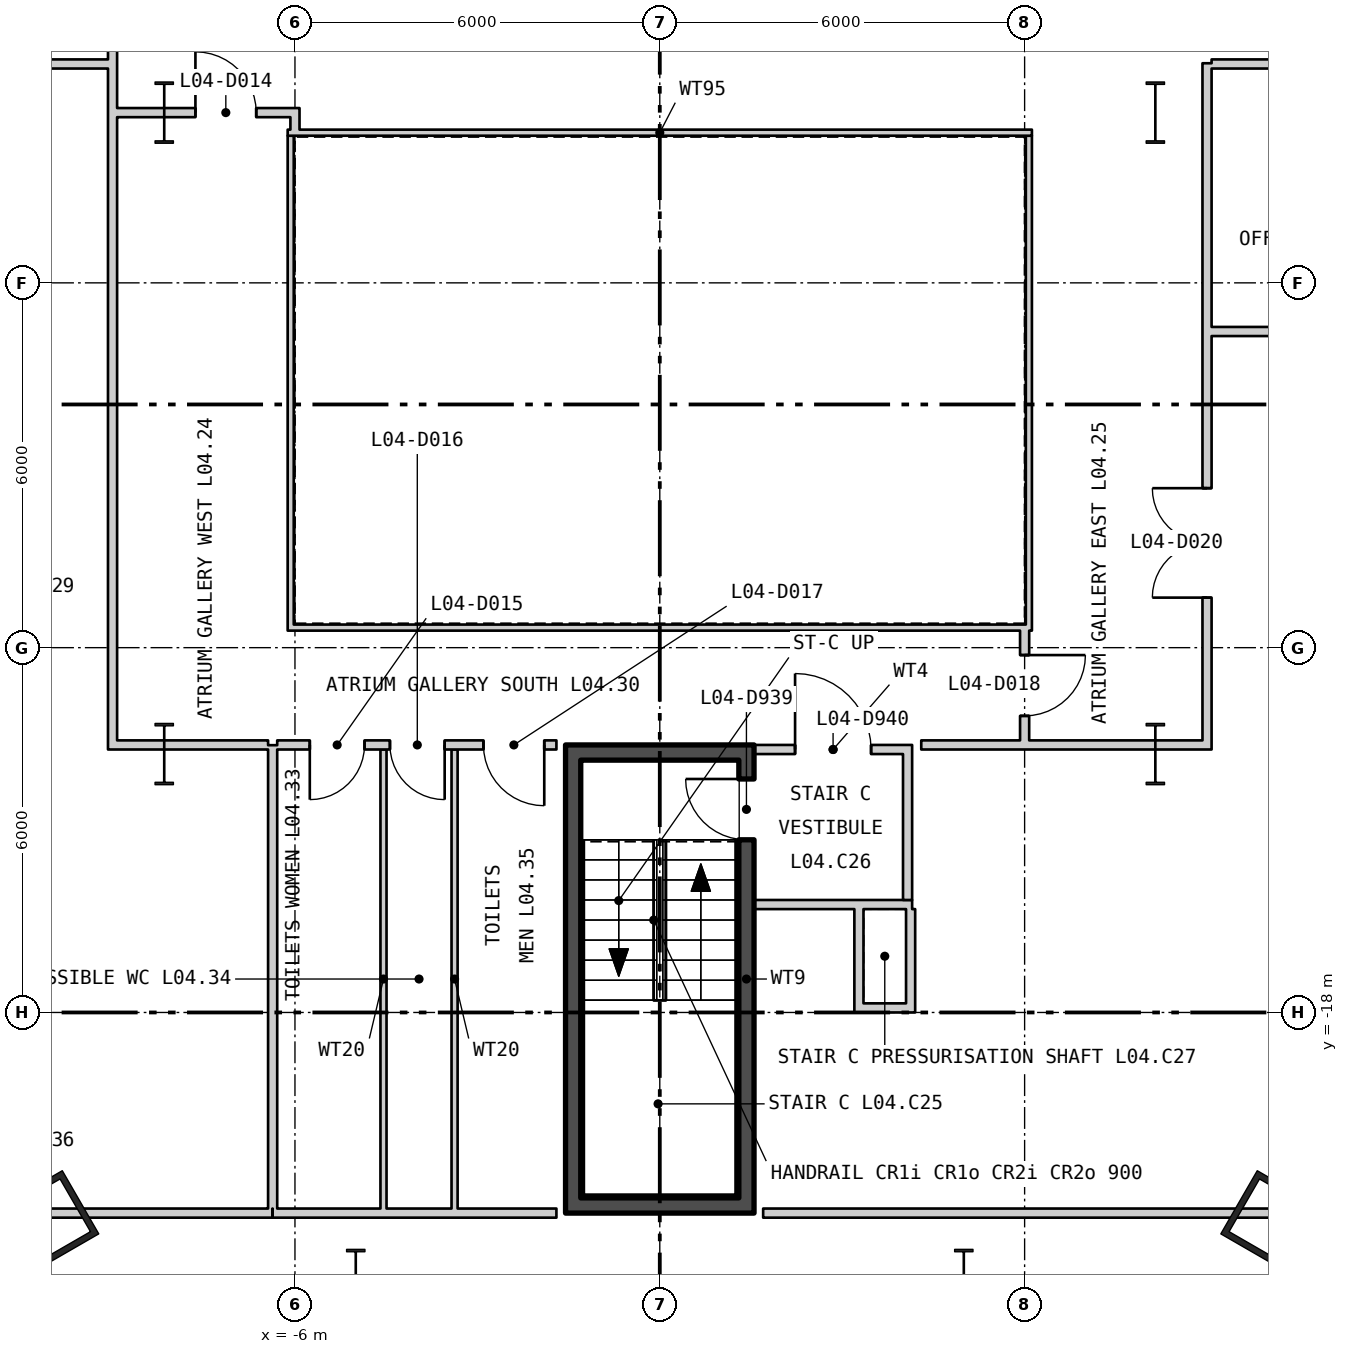
"""IFC4 building model, lengths in metres.
Left out: names, types, materials, properties, quantities, classifications, styles, units other than length and angle.
Written with IfcOpenShell. Run it as: python <this file> out.ifc"""

import sys

from ifc_helpers import new_model, si_unit, direction, frame, frame_2d, origin, origin_2d, place, context, subcontext, project, spatial, rectangle, hollow_rectangle, i_section, extrude, element, fill, save


model = new_model("IFC4")
c1 = context("Model", 3, precision=1e-05, world=origin(), true_north=direction((0.0, 1.0)))
c2 = subcontext(c1, "Body", "Model", "MODEL_VIEW")
j1 = project(units=[si_unit("LENGTHUNIT", "METRE"), si_unit("PLANEANGLEUNIT", "RADIAN")], contexts=[c1])
p1 = place(None, origin())
s1 = spatial("IfcSite", under=j1, at=p1, CompositionType="ELEMENT")
p2 = place(p1, origin())
s2 = spatial("IfcBuilding", under=s1, at=p2, CompositionType="ELEMENT")
p3 = place(p2, frame((0.0, 0.0, 23.7)))
s3 = spatial("IfcBuildingStorey", under=s2, at=p3, CompositionType="ELEMENT", Elevation=23.7)
for number, where, z_axis, x_axis in (
    (1, (-10.046, -21.422, 0.0), (0.0, 0.0, 1.0), (0.5, -0.866, 0.0)),
    (2, (10.046, -21.422, 0.0), (0.0, 0.0, 1.0), (0.5, 0.866, 0.0)),
):
    element("IfcColumn", number, at=place(p3, frame(where, z_axis=z_axis, x_axis=x_axis)), inside=s3, PredefinedType="COLUMN", context=c2, shape_type="SweptSolid", body=[
        extrude(hollow_rectangle(XDim=1.2, YDim=1.2, WallThickness=0.1, at=origin_2d()), origin(), (0.0, 0.0, 1.0), 5.1),
    ])
for number, where, z_axis, x_axis in (
    (3, (8.15, -3.2, 0.0), (0.0, 0.0, 1.0), (1.0, 0.0, 0.0)),
    (4, (-8.15, -3.2, 0.0), (0.0, 0.0, 1.0), (1.0, 0.0, 0.0)),
    (5, (8.15, -13.75, 0.0), (0.0, 0.0, 1.0), (1.0, 0.0, 0.0)),
    (6, (-8.15, -13.75, 0.0), (0.0, 0.0, 1.0), (1.0, 0.0, 0.0)),
    (7, (5.0, -22.4, 0.0), (0.0, 0.0, 1.0), (1.0, 0.0, 0.0)),
    (8, (-5.0, -22.4, 0.0), (0.0, 0.0, 1.0), (1.0, 0.0, 0.0)),
):
    element("IfcColumn", number, at=place(p3, frame(where, z_axis=z_axis, x_axis=x_axis)), inside=s3, PredefinedType="COLUMN", context=c2, shape_type="SweptSolid", body=[
        extrude(i_section(OverallWidth=0.302, OverallDepth=1.008, WebThickness=0.021, FlangeThickness=0.04, at=origin_2d()), origin(), (0.0, 0.0, 1.0), 5.1),
    ])
p4 = place(p3, frame((-6.12, -11.67, 0.0), z_axis=(0.0, 0.0, 1.0), x_axis=(1.0, 0.0, 0.0)))
e9 = element("IfcWall", 9, at=p4, inside=s3, PredefinedType="PARTITIONING", context=c2, shape_type="SweptSolid", body=[
    extrude(rectangle(XDim=12.24, YDim=0.1, at=frame_2d((6.12, 0.0))), origin(), (0.0, 0.0, 1.0), 4.85),
])
p5 = place(p3, frame((6.07, -11.62, 0.0), z_axis=(0.0, 0.0, 1.0), x_axis=(0.0, 1.0, 0.0)))
e10 = element("IfcWall", 10, at=p5, inside=s3, PredefinedType="PARTITIONING", context=c2, shape_type="SweptSolid", body=[
    extrude(rectangle(XDim=8.04, YDim=0.1, at=frame_2d((4.02, 0.0))), origin(), (0.0, 0.0, 1.0), 4.85),
])
p6 = place(p3, frame((6.12, -3.53, 0.0), z_axis=(0.0, 0.0, 1.0), x_axis=(-1.0, 0.0, 0.0)))
e11 = element("IfcWall", 11, at=p6, inside=s3, PredefinedType="PARTITIONING", context=c2, shape_type="SweptSolid", body=[
    extrude(rectangle(XDim=12.24, YDim=0.1, at=frame_2d((6.12, 0.0))), origin(), (0.0, 0.0, 1.0), 4.85),
])
p7 = place(p3, frame((-6.07, -3.58, 0.0), z_axis=(0.0, 0.0, 1.0), x_axis=(0.0, -1.0, 0.0)))
e12 = element("IfcWall", 12, at=p7, inside=s3, PredefinedType="PARTITIONING", context=c2, shape_type="SweptSolid", body=[
    extrude(rectangle(XDim=8.04, YDim=0.1, at=frame_2d((4.02, 0.0))), origin(), (0.0, 0.0, 1.0), 4.85),
])
p8 = place(p3, frame((-1.425, -21.05, 0.0), z_axis=(0.0, 0.0, 1.0), x_axis=(0.0, 1.0, 0.0)))
e13 = element("IfcWall", 13, at=p8, inside=s3, PredefinedType="SHEAR", context=c2, shape_type="SweptSolid", body=[
    extrude(rectangle(XDim=7.2, YDim=0.25, at=frame_2d((3.6, 0.0))), origin(), (0.0, 0.0, 1.0), 4.85),
])
p9 = place(p3, frame((1.425, -21.05, 0.0), z_axis=(0.0, 0.0, 1.0), x_axis=(0.0, 1.0, 0.0)))
e14 = element("IfcWall", 14, at=p9, inside=s3, PredefinedType="SHEAR", context=c2, shape_type="SweptSolid", body=[
    extrude(rectangle(XDim=7.2, YDim=0.25, at=frame_2d((3.6, 0.0))), origin(), (0.0, 0.0, 1.0), 4.85),
])
p10 = place(p9, frame((5.89, 0.0, 0.0)))
e15 = element("IfcOpeningElement", 15, at=p10, cuts=e14, PredefinedType="OPENING", context=c2, shape_type="SweptSolid", body=[
    extrude(rectangle(XDim=1.0, YDim=2.1, at=frame_2d((0.5, 1.05))), frame((0.0, 0.135, 0.0), z_axis=(0.0, -1.0, 0.0), x_axis=(1.0, 0.0, 0.0)), (0.0, 0.0, 1.0), 0.27),
])
for number, where, z_axis, x_axis in (
    (16, (-1.55, -21.175, 0.0), (0.0, 0.0, 1.0), (1.0, 0.0, 0.0)),
    (17, (-1.55, -13.725, 0.0), (0.0, 0.0, 1.0), (1.0, 0.0, 0.0)),
):
    element("IfcWall", number, at=place(p3, frame(where, z_axis=z_axis, x_axis=x_axis)), inside=s3, PredefinedType="SHEAR", context=c2, shape_type="SweptSolid", body=[
        extrude(rectangle(XDim=3.1, YDim=0.25, at=frame_2d((1.55, 0.0))), origin(), (0.0, 0.0, 1.0), 4.85),
    ])
p11 = place(p3, frame((1.55, -16.225, 0.0), z_axis=(0.0, 0.0, 1.0), x_axis=(1.0, 0.0, 0.0)))
e18 = element("IfcWall", 18, at=p11, inside=s3, PredefinedType="PARTITIONING", context=c2, shape_type="SweptSolid", body=[
    extrude(rectangle(XDim=2.6, YDim=0.15, at=frame_2d((1.3, 0.0))), origin(), (0.0, 0.0, 1.0), 4.85),
])
p12 = place(p3, frame((4.075, -16.15, 0.0), z_axis=(0.0, 0.0, 1.0), x_axis=(0.0, 1.0, 0.0)))
e19 = element("IfcWall", 19, at=p12, inside=s3, PredefinedType="PARTITIONING", context=c2, shape_type="SweptSolid", body=[
    extrude(rectangle(XDim=2.4, YDim=0.15, at=frame_2d((1.2, 0.0))), origin(), (0.0, 0.0, 1.0), 4.85),
])
p13 = place(p3, frame((1.55, -13.675, 0.0), z_axis=(0.0, 0.0, 1.0), x_axis=(1.0, 0.0, 0.0)))
e20 = element("IfcWall", 20, at=p13, inside=s3, PredefinedType="PARTITIONING", context=c2, shape_type="SweptSolid", body=[
    extrude(rectangle(XDim=2.6, YDim=0.15, at=frame_2d((1.3, 0.0))), origin(), (0.0, 0.0, 1.0), 3.94),
])
p14 = place(p13, frame((0.675, 0.0, 0.0)))
e21 = element("IfcOpeningElement", 21, at=p14, cuts=e20, PredefinedType="OPENING", context=c2, shape_type="SweptSolid", body=[
    extrude(rectangle(XDim=1.25, YDim=2.1, at=frame_2d((0.625, 1.05))), frame((0.0, 0.085, 0.0), z_axis=(0.0, -1.0, 0.0), x_axis=(1.0, 0.0, 0.0)), (0.0, 0.0, 1.0), 0.17),
])
p15 = place(p3, frame((3.275, -18.0, 0.0), z_axis=(0.0, 0.0, 1.0), x_axis=(0.0, 1.0, 0.0)))
e22 = element("IfcWall", 22, at=p15, inside=s3, PredefinedType="PARTITIONING", context=c2, shape_type="SweptSolid", body=[
    extrude(rectangle(XDim=1.7, YDim=0.15, at=frame_2d((0.85, 0.0))), origin(), (0.0, 0.0, 1.0), 4.25),
])
p16 = place(p3, frame((3.35, -17.925, 0.0), z_axis=(0.0, 0.0, 1.0), x_axis=(1.0, 0.0, 0.0)))
e23 = element("IfcWall", 23, at=p16, inside=s3, PredefinedType="PARTITIONING", context=c2, shape_type="SweptSolid", body=[
    extrude(rectangle(XDim=0.7, YDim=0.15, at=frame_2d((0.35, 0.0))), origin(), (0.0, 0.0, 1.0), 4.85),
])
p17 = place(p3, frame((4.125, -18.0, 0.0), z_axis=(0.0, 0.0, 1.0), x_axis=(0.0, 1.0, 0.0)))
e24 = element("IfcWall", 24, at=p17, inside=s3, PredefinedType="PARTITIONING", context=c2, shape_type="SweptSolid", body=[
    extrude(rectangle(XDim=1.7, YDim=0.15, at=frame_2d((0.85, 0.0))), origin(), (0.0, 0.0, 1.0), 4.85),
])
p18 = place(p3, frame((-17.025, -21.3, 0.0), z_axis=(0.0, 0.0, 1.0), x_axis=(1.0, 0.0, 0.0)))
e25 = element("IfcWall", 25, at=p18, inside=s3, PredefinedType="PARTITIONING", context=c2, shape_type="SweptSolid", body=[
    extrude(rectangle(XDim=10.654, YDim=0.15, at=frame_2d((5.327, 0.0))), origin(), (0.0, 0.0, 1.0), 4.85),
])
p19 = place(p3, frame((-17.025, -2.4, 0.0), z_axis=(0.0, 0.0, 1.0), x_axis=(1.0, 0.0, 0.0)))
e26 = element("IfcWall", 26, at=p19, inside=s3, PredefinedType="PARTITIONING", context=c2, shape_type="SweptSolid", body=[
    extrude(rectangle(XDim=7.95, YDim=0.15, at=frame_2d((3.975, 0.0))), origin(), (0.0, 0.0, 1.0), 4.85),
])
p20 = place(p19, frame((5.294, 0.0, 0.0)))
e27 = element("IfcOpeningElement", 27, at=p20, cuts=e26, PredefinedType="OPENING", context=c2, shape_type="SweptSolid", body=[
    extrude(rectangle(XDim=1.0, YDim=2.1, at=frame_2d((0.5, 1.05))), frame((0.0, 0.085, 0.0), z_axis=(0.0, -1.0, 0.0), x_axis=(1.0, 0.0, 0.0)), (0.0, 0.0, 1.0), 0.17),
])
p21 = place(p3, frame((-9.0, -13.675, 0.0), z_axis=(0.0, 0.0, 1.0), x_axis=(0.0, 1.0, 0.0)))
e28 = element("IfcWall", 28, at=p21, inside=s3, PredefinedType="PARTITIONING", context=c2, shape_type="SweptSolid", body=[
    extrude(rectangle(XDim=13.675, YDim=0.15, at=frame_2d((6.838, 0.0))), origin(), (0.0, 0.0, 1.0), 4.85),
])
p22 = place(p21, frame((11.975, 0.0, 0.0)))
e29 = element("IfcOpeningElement", 29, at=p22, cuts=e28, PredefinedType="OPENING", context=c2, shape_type="SweptSolid", body=[
    extrude(rectangle(XDim=1.0, YDim=2.1, at=frame_2d((0.5, 1.05))), frame((0.0, 0.085, 0.0), z_axis=(0.0, -1.0, 0.0), x_axis=(1.0, 0.0, 0.0)), (0.0, 0.0, 1.0), 0.17),
])
p23 = place(p3, frame((-8.925, -13.6, 0.0), z_axis=(0.0, 0.0, 1.0), x_axis=(1.0, 0.0, 0.0)))
e30 = element("IfcWall", 30, at=p23, inside=s3, PredefinedType="PARTITIONING", context=c2, shape_type="SweptSolid", body=[
    extrude(rectangle(XDim=0.775, YDim=0.15, at=frame_2d((0.388, 0.0))), origin(), (0.0, 0.0, 1.0), 3.842),
])
p24 = place(p3, frame((-8.15, -13.6, 0.0), z_axis=(0.0, 0.0, 1.0), x_axis=(1.0, 0.0, 0.0)))
e31 = element("IfcWall", 31, at=p24, inside=s3, PredefinedType="PARTITIONING", context=c2, shape_type="SweptSolid", body=[
    extrude(rectangle(XDim=1.708, YDim=0.15, at=frame_2d((0.854, 0.0))), origin(), (0.0, 0.0, 1.0), 3.94),
])
p25 = place(p3, frame((-8.925, -3.2, 0.0), z_axis=(0.0, 0.0, 1.0), x_axis=(1.0, 0.0, 0.0)))
e32 = element("IfcWall", 32, at=p25, inside=s3, PredefinedType="PARTITIONING", context=c2, shape_type="SweptSolid", body=[
    extrude(rectangle(XDim=0.775, YDim=0.15, at=frame_2d((0.388, 0.0))), origin(), (0.0, 0.0, 1.0), 4.16),
])
p26 = place(p3, frame((-8.15, -3.2, 0.0), z_axis=(0.0, 0.0, 1.0), x_axis=(1.0, 0.0, 0.0)))
e33 = element("IfcWall", 33, at=p26, inside=s3, PredefinedType="PARTITIONING", context=c2, shape_type="SweptSolid", body=[
    extrude(rectangle(XDim=2.225, YDim=0.15, at=frame_2d((1.113, 0.0))), origin(), (0.0, 0.0, 1.0), 3.94),
])
p27 = place(p26, frame((0.513, 0.0, 0.0)))
e34 = element("IfcOpeningElement", 34, at=p27, cuts=e33, PredefinedType="OPENING", context=c2, shape_type="SweptSolid", body=[
    extrude(rectangle(XDim=1.0, YDim=2.1, at=frame_2d((0.5, 1.05))), frame((0.0, 0.085, 0.0), z_axis=(0.0, -1.0, 0.0), x_axis=(1.0, 0.0, 0.0)), (0.0, 0.0, 1.0), 0.17),
])
p28 = place(p3, frame((-6.367, -21.3, 0.0), z_axis=(0.0, 0.0, 1.0), x_axis=(1.0, 0.0, 0.0)))
e35 = element("IfcWall", 35, at=p28, inside=s3, PredefinedType="PARTITIONING", context=c2, shape_type="SweptSolid", body=[
    extrude(rectangle(XDim=4.667, YDim=0.15, at=frame_2d((2.333, 0.0))), origin(), (0.0, 0.0, 1.0), 4.85),
])
p29 = place(p3, frame((-6.367, -21.225, 0.0), z_axis=(0.0, 0.0, 1.0), x_axis=(0.0, 1.0, 0.0)))
e36 = element("IfcWall", 36, at=p29, inside=s3, PredefinedType="PARTITIONING", context=c2, shape_type="SweptSolid", body=[
    extrude(rectangle(XDim=7.621, YDim=0.15, at=frame_2d((3.811, 0.0))), origin(), (0.0, 0.0, 1.0), 4.25),
])
p30 = place(p3, frame((-6.292, -13.6, 0.0), z_axis=(0.0, 0.0, 1.0), x_axis=(1.0, 0.0, 0.0)))
e37 = element("IfcWall", 37, at=p30, inside=s3, PredefinedType="PARTITIONING", context=c2, shape_type="SweptSolid", body=[
    extrude(rectangle(XDim=4.592, YDim=0.15, at=frame_2d((2.296, 0.0))), origin(), (0.0, 0.0, 1.0), 3.94),
])
p31 = place(p30, frame((0.536, 0.0, 0.0)))
e38 = element("IfcOpeningElement", 38, at=p31, cuts=e37, PredefinedType="OPENING", context=c2, shape_type="SweptSolid", body=[
    extrude(rectangle(XDim=0.9, YDim=2.1, at=frame_2d((0.45, 1.05))), frame((0.0, 0.085, 0.0), z_axis=(0.0, -1.0, 0.0), x_axis=(1.0, 0.0, 0.0)), (0.0, 0.0, 1.0), 0.17),
])
p32 = place(p30, frame((1.854, 0.0, 0.0)))
e39 = element("IfcOpeningElement", 39, at=p32, cuts=e37, PredefinedType="OPENING", context=c2, shape_type="SweptSolid", body=[
    extrude(rectangle(XDim=0.9, YDim=2.1, at=frame_2d((0.45, 1.05))), frame((0.0, 0.085, 0.0), z_axis=(0.0, -1.0, 0.0), x_axis=(1.0, 0.0, 0.0)), (0.0, 0.0, 1.0), 0.17),
])
p33 = place(p30, frame((3.392, 0.0, 0.0)))
e40 = element("IfcOpeningElement", 40, at=p33, cuts=e37, PredefinedType="OPENING", context=c2, shape_type="SweptSolid", body=[
    extrude(rectangle(XDim=1.0, YDim=2.1, at=frame_2d((0.5, 1.05))), frame((0.0, 0.085, 0.0), z_axis=(0.0, -1.0, 0.0), x_axis=(1.0, 0.0, 0.0)), (0.0, 0.0, 1.0), 0.17),
])
p34 = place(p3, frame((-6.0, -3.48, 0.0), z_axis=(0.0, 0.0, 1.0), x_axis=(0.0, 1.0, 0.0)))
e41 = element("IfcWall", 41, at=p34, inside=s3, PredefinedType="PARTITIONING", context=c2, shape_type="SweptSolid", body=[
    extrude(rectangle(XDim=0.205, YDim=0.15, at=frame_2d((0.102, 0.0))), origin(), (0.0, 0.0, 1.0), 4.85),
])
for number, where, z_axis, x_axis in (
    (42, (-4.544, -21.225, 0.0), (0.0, 0.0, 1.0), (0.0, 1.0, 0.0)),
    (43, (-3.375, -21.225, 0.0), (0.0, 0.0, 1.0), (0.0, 1.0, 0.0)),
):
    element("IfcWall", number, at=place(p3, frame(where, z_axis=z_axis, x_axis=x_axis)), inside=s3, PredefinedType="PARTITIONING", context=c2, shape_type="SweptSolid", body=[
        extrude(rectangle(XDim=7.55, YDim=0.1, at=frame_2d((3.775, 0.0))), origin(), (0.0, 0.0, 1.0), 4.85),
    ])
p35 = place(p3, frame((1.7, -21.3, 0.0), z_axis=(0.0, 0.0, 1.0), x_axis=(1.0, 0.0, 0.0)))
e44 = element("IfcWall", 44, at=p35, inside=s3, PredefinedType="PARTITIONING", context=c2, shape_type="SweptSolid", body=[
    extrude(rectangle(XDim=15.325, YDim=0.15, at=frame_2d((7.662, 0.0))), origin(), (0.0, 0.0, 1.0), 4.85),
])
p36 = place(p3, frame((4.3, -13.6, 0.0), z_axis=(0.0, 0.0, 1.0), x_axis=(1.0, 0.0, 0.0)))
e45 = element("IfcWall", 45, at=p36, inside=s3, PredefinedType="PARTITIONING", context=c2, shape_type="SweptSolid", body=[
    extrude(rectangle(XDim=3.85, YDim=0.15, at=frame_2d((1.925, 0.0))), origin(), (0.0, 0.0, 1.0), 3.94),
])
p37 = place(p3, frame((8.15, -13.6, 0.0), z_axis=(0.0, 0.0, 1.0), x_axis=(1.0, 0.0, 0.0)))
e46 = element("IfcWall", 46, at=p37, inside=s3, PredefinedType="PARTITIONING", context=c2, shape_type="SweptSolid", body=[
    extrude(rectangle(XDim=0.775, YDim=0.15, at=frame_2d((0.388, 0.0))), origin(), (0.0, 0.0, 1.0), 3.842),
])
p38 = place(p3, frame((6.0, -13.525, 0.0), z_axis=(0.0, 0.0, 1.0), x_axis=(0.0, 1.0, 0.0)))
e47 = element("IfcWall", 47, at=p38, inside=s3, PredefinedType="PARTITIONING", context=c2, shape_type="SweptSolid", body=[
    extrude(rectangle(XDim=1.805, YDim=0.15, at=frame_2d((0.902, 0.0))), origin(), (0.0, 0.0, 1.0), 4.85),
])
p39 = place(p38, frame((0.403, 0.0, 0.0)))
e48 = element("IfcOpeningElement", 48, at=p39, cuts=e47, PredefinedType="OPENING", context=c2, shape_type="SweptSolid", body=[
    extrude(rectangle(XDim=1.0, YDim=2.1, at=frame_2d((0.5, 1.05))), frame((0.0, 0.085, 0.0), z_axis=(0.0, -1.0, 0.0), x_axis=(1.0, 0.0, 0.0)), (0.0, 0.0, 1.0), 0.17),
])
p40 = place(p3, frame((9.0, -13.675, 0.0), z_axis=(0.0, 0.0, 1.0), x_axis=(0.0, 1.0, 0.0)))
e49 = element("IfcWall", 49, at=p40, inside=s3, PredefinedType="PARTITIONING", context=c2, shape_type="SweptSolid", body=[
    extrude(rectangle(XDim=11.287, YDim=0.15, at=frame_2d((5.644, 0.0))), origin(), (0.0, 0.0, 1.0), 4.85),
])
p41 = place(p40, frame((2.498, 0.0, 0.0)))
e50 = element("IfcOpeningElement", 50, at=p41, cuts=e49, PredefinedType="OPENING", context=c2, shape_type="SweptSolid", body=[
    extrude(rectangle(XDim=1.8, YDim=2.1, at=frame_2d((0.9, 1.05))), frame((0.0, 0.085, 0.0), z_axis=(0.0, -1.0, 0.0), x_axis=(1.0, 0.0, 0.0)), (0.0, 0.0, 1.0), 0.17),
])
p42 = place(p3, frame((9.075, -6.8, 0.0), z_axis=(0.0, 0.0, 1.0), x_axis=(1.0, 0.0, 0.0)))
e51 = element("IfcWall", 51, at=p42, inside=s3, PredefinedType="PARTITIONING", context=c2, shape_type="SweptSolid", body=[
    extrude(rectangle(XDim=7.95, YDim=0.15, at=frame_2d((3.975, 0.0))), origin(), (0.0, 0.0, 1.0), 4.85),
])
p43 = place(p3, frame((9.075, -2.4, 0.0), z_axis=(0.0, 0.0, 1.0), x_axis=(1.0, 0.0, 0.0)))
e52 = element("IfcWall", 52, at=p43, inside=s3, PredefinedType="PARTITIONING", context=c2, shape_type="SweptSolid", body=[
    extrude(rectangle(XDim=7.95, YDim=0.15, at=frame_2d((3.975, 0.0))), origin(), (0.0, 0.0, 1.0), 4.85),
])
p44 = place(p43, frame((1.329, 0.0, 0.0)))
e53 = element("IfcOpeningElement", 53, at=p44, cuts=e52, PredefinedType="OPENING", context=c2, shape_type="SweptSolid", body=[
    extrude(rectangle(XDim=1.0, YDim=2.1, at=frame_2d((0.5, 1.05))), frame((0.0, 0.085, 0.0), z_axis=(0.0, -1.0, 0.0), x_axis=(1.0, 0.0, 0.0)), (0.0, 0.0, 1.0), 0.17),
])
p45 = place(p43, frame((5.279, 0.0, 0.0)))
e54 = element("IfcOpeningElement", 54, at=p45, cuts=e52, PredefinedType="OPENING", context=c2, shape_type="SweptSolid", body=[
    extrude(rectangle(XDim=1.0, YDim=2.1, at=frame_2d((0.5, 1.05))), frame((0.0, 0.085, 0.0), z_axis=(0.0, -1.0, 0.0), x_axis=(1.0, 0.0, 0.0)), (0.0, 0.0, 1.0), 0.17),
])
p46 = place(p10, origin())
e55 = element("IfcDoor", 55, at=p46, inside=s3, OperationType="SINGLE_SWING_LEFT", PredefinedType="DOOR", context=c2, shape_type="SweptSolid", body=[
    extrude(rectangle(XDim=1.0, YDim=2.1, at=frame_2d((0.5, 1.05))), frame((0.0, 0.025, 0.0), z_axis=(0.0, -1.0, 0.0), x_axis=(1.0, 0.0, 0.0)), (0.0, 0.0, 1.0), 0.05),
])
fill(e15, e55)
p47 = place(p14, origin())
e56 = element("IfcDoor", 56, at=p47, inside=s3, OperationType="SINGLE_SWING_RIGHT", PredefinedType="DOOR", context=c2, shape_type="SweptSolid", body=[
    extrude(rectangle(XDim=1.25, YDim=2.1, at=frame_2d((0.625, 1.05))), frame((0.0, 0.025, 0.0), z_axis=(0.0, -1.0, 0.0), x_axis=(1.0, 0.0, 0.0)), (0.0, 0.0, 1.0), 0.05),
])
fill(e21, e56)
p48 = place(p27, origin())
e57 = element("IfcDoor", 57, at=p48, inside=s3, OperationType="SINGLE_SWING_RIGHT", PredefinedType="DOOR", context=c2, shape_type="SweptSolid", body=[
    extrude(rectangle(XDim=1.0, YDim=2.1, at=frame_2d((0.5, 1.05))), frame((0.0, 0.025, 0.0), z_axis=(0.0, -1.0, 0.0), x_axis=(1.0, 0.0, 0.0)), (0.0, 0.0, 1.0), 0.05),
])
fill(e34, e57)
p49 = place(p31, origin())
e58 = element("IfcDoor", 58, at=p49, inside=s3, OperationType="SINGLE_SWING_LEFT", PredefinedType="DOOR", context=c2, shape_type="SweptSolid", body=[
    extrude(rectangle(XDim=0.9, YDim=2.1, at=frame_2d((0.45, 1.05))), frame((0.0, 0.025, 0.0), z_axis=(0.0, -1.0, 0.0), x_axis=(1.0, 0.0, 0.0)), (0.0, 0.0, 1.0), 0.05),
])
fill(e38, e58)
p50 = place(p32, origin())
e59 = element("IfcDoor", 59, at=p50, inside=s3, OperationType="SINGLE_SWING_RIGHT", PredefinedType="DOOR", context=c2, shape_type="SweptSolid", body=[
    extrude(rectangle(XDim=0.9, YDim=2.1, at=frame_2d((0.45, 1.05))), frame((0.0, 0.025, 0.0), z_axis=(0.0, -1.0, 0.0), x_axis=(1.0, 0.0, 0.0)), (0.0, 0.0, 1.0), 0.05),
])
fill(e39, e59)
p51 = place(p33, origin())
e60 = element("IfcDoor", 60, at=p51, inside=s3, OperationType="SINGLE_SWING_RIGHT", PredefinedType="DOOR", context=c2, shape_type="SweptSolid", body=[
    extrude(rectangle(XDim=1.0, YDim=2.1, at=frame_2d((0.5, 1.05))), frame((0.0, 0.025, 0.0), z_axis=(0.0, -1.0, 0.0), x_axis=(1.0, 0.0, 0.0)), (0.0, 0.0, 1.0), 0.05),
])
fill(e40, e60)
p52 = place(p39, origin())
e61 = element("IfcDoor", 61, at=p52, inside=s3, OperationType="SINGLE_SWING_RIGHT", PredefinedType="DOOR", context=c2, shape_type="SweptSolid", body=[
    extrude(rectangle(XDim=1.0, YDim=2.1, at=frame_2d((0.5, 1.05))), frame((0.0, 0.025, 0.0), z_axis=(0.0, -1.0, 0.0), x_axis=(1.0, 0.0, 0.0)), (0.0, 0.0, 1.0), 0.05),
])
fill(e48, e61)
p53 = place(p41, origin())
e62 = element("IfcDoor", 62, at=p53, inside=s3, OperationType="DOUBLE_DOOR_SINGLE_SWING", PredefinedType="DOOR", context=c2, shape_type="SweptSolid", body=[
    extrude(rectangle(XDim=1.8, YDim=2.1, at=frame_2d((0.9, 1.05))), frame((0.0, 0.025, 0.0), z_axis=(0.0, -1.0, 0.0), x_axis=(1.0, 0.0, 0.0)), (0.0, 0.0, 1.0), 0.05),
])
fill(e50, e62)
save(model, sys.argv[1])
